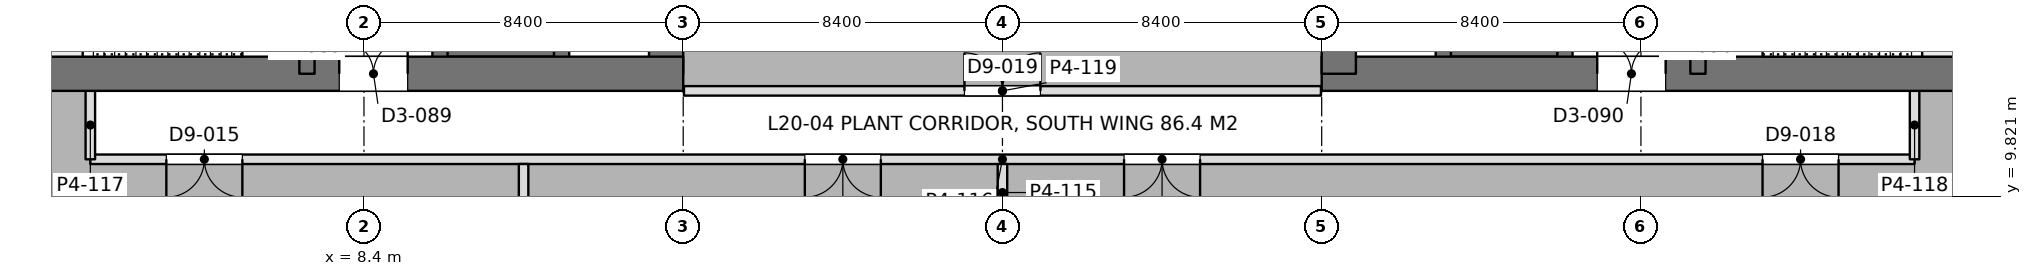
"""IFC4 building model, lengths in metres.
Left out: names, types, materials, properties, quantities, classifications, styles, units other than length and angle.
Written with IfcOpenShell. Run it as: python <this file> out.ifc"""

import sys

from ifc_helpers import new_model, si_unit, direction, frame, frame_2d, origin, place, context, subcontext, project, spatial, rectangle, extrude, element, fill, save


model = new_model("IFC4")
c1 = context("Model", 3, precision=1e-05, world=origin(), true_north=direction((0.0, 1.0)))
c2 = subcontext(c1, "Body", "Model", "MODEL_VIEW")
j1 = project(units=[si_unit("LENGTHUNIT", "METRE"), si_unit("PLANEANGLEUNIT", "RADIAN")], contexts=[c1])
p1 = place(None, origin())
s1 = spatial("IfcSite", under=j1, at=p1, CompositionType="ELEMENT")
p2 = place(p1, origin())
s2 = spatial("IfcBuilding", under=s1, at=p2, CompositionType="ELEMENT")
p3 = place(p2, frame((0.0, 0.0, 90.9)))
s3 = spatial("IfcBuildingStorey", under=s2, at=p3, CompositionType="ELEMENT", Elevation=90.9)
p4 = place(p3, frame((-1.2, 13.05, 0.0), z_axis=(0.0, 0.0, 1.0), x_axis=(1.0, 0.0, 0.0)))
e1 = element("IfcWall", 1, at=p4, inside=s3, PredefinedType="SHEAR", context=c2, shape_type="SweptSolid", body=[
    extrude(rectangle(XDim=18.0, YDim=0.9, at=frame_2d((9.0, 0.0))), origin(), (0.0, 0.0, 1.0), 5.4),
])
p5 = place(p4, frame((8.95, 0.0, 0.0)))
e2 = element("IfcOpeningElement", 2, at=p5, cuts=e1, PredefinedType="OPENING", context=c2, shape_type="SweptSolid", body=[
    extrude(rectangle(XDim=1.8, YDim=2.4, at=frame_2d((0.9, 1.2))), frame((0.0, 0.46, 0.0), z_axis=(0.0, -1.0, 0.0), x_axis=(1.0, 0.0, 0.0)), (0.0, 0.0, 1.0), 0.92),
])
p6 = place(p3, frame((16.35, 13.05, 0.0), z_axis=(0.0, 0.0, 1.0), x_axis=(0.0, 1.0, 0.0)))
e3 = element("IfcWall", 3, at=p6, inside=s3, PredefinedType="SHEAR", context=c2, shape_type="SweptSolid", body=[
    extrude(rectangle(XDim=24.3, YDim=0.9, at=frame_2d((12.15, 0.0))), origin(), (0.0, 0.0, 1.0), 5.4),
])
p7 = place(p3, frame((6.9, 13.05, 0.0), z_axis=(0.0, 0.0, 1.0), x_axis=(0.0, 1.0, 0.0)))
e4 = element("IfcWall", 4, at=p7, inside=s3, PredefinedType="SHEAR", context=c2, shape_type="SweptSolid", body=[
    extrude(rectangle(XDim=24.3, YDim=0.4, at=frame_2d((12.15, 0.0))), origin(), (0.0, 0.0, 1.0), 5.4),
])
p8 = place(p7, frame((1.3, 0.0, 0.0)))
e5 = element("IfcOpeningElement", 5, at=p8, cuts=e4, PredefinedType="OPENING", context=c2, shape_type="SweptSolid", body=[
    extrude(rectangle(XDim=1.0, YDim=2.2, at=frame_2d((0.5, 1.1))), frame((0.0, 0.21, 0.0), z_axis=(0.0, -1.0, 0.0), x_axis=(1.0, 0.0, 0.0)), (0.0, 0.0, 1.0), 0.42),
])
p9 = place(p7, frame((22.0, 0.0, 0.0)))
e6 = element("IfcOpeningElement", 6, at=p9, cuts=e4, PredefinedType="OPENING", context=c2, shape_type="SweptSolid", body=[
    extrude(rectangle(XDim=1.0, YDim=2.2, at=frame_2d((0.5, 1.1))), frame((0.0, 0.21, 0.0), z_axis=(0.0, -1.0, 0.0), x_axis=(1.0, 0.0, 0.0)), (0.0, 0.0, 1.0), 0.42),
])
p10 = place(p7, frame((5.55, 0.0, 0.0)))
e7 = element("IfcOpeningElement", 7, at=p10, cuts=e4, PredefinedType="OPENING", context=c2, shape_type="SweptSolid", body=[
    extrude(rectangle(XDim=1.0, YDim=2.2, at=frame_2d((0.5, 1.1))), frame((0.0, 0.21, 0.0), z_axis=(0.0, -1.0, 0.0), x_axis=(1.0, 0.0, 0.0)), (0.0, 0.0, 1.0), 0.42),
])
p11 = place(p7, frame((9.55, 0.0, 0.0)))
e8 = element("IfcOpeningElement", 8, at=p11, cuts=e4, PredefinedType="OPENING", context=c2, shape_type="SweptSolid", body=[
    extrude(rectangle(XDim=1.0, YDim=2.2, at=frame_2d((0.5, 1.1))), frame((0.0, 0.21, 0.0), z_axis=(0.0, -1.0, 0.0), x_axis=(1.0, 0.0, 0.0)), (0.0, 0.0, 1.0), 0.42),
])
p12 = place(p7, frame((12.8, 0.0, 0.0)))
e9 = element("IfcOpeningElement", 9, at=p12, cuts=e4, PredefinedType="OPENING", context=c2, shape_type="SweptSolid", body=[
    extrude(rectangle(XDim=1.1, YDim=2.2, at=frame_2d((0.55, 1.1))), frame((0.0, 0.21, 0.0), z_axis=(0.0, -1.0, 0.0), x_axis=(1.0, 0.0, 0.0)), (0.0, 0.0, 1.0), 0.42),
])
p13 = place(p7, frame((15.538, 0.0, 0.0)))
e10 = element("IfcOpeningElement", 10, at=p13, cuts=e4, PredefinedType="OPENING", context=c2, shape_type="SweptSolid", body=[
    extrude(rectangle(XDim=1.1, YDim=2.2, at=frame_2d((0.55, 1.1))), frame((0.0, 0.21, 0.0), z_axis=(0.0, -1.0, 0.0), x_axis=(1.0, 0.0, 0.0)), (0.0, 0.0, 1.0), 0.42),
])
p14 = place(p7, frame((18.262, 0.0, 0.0)))
e11 = element("IfcOpeningElement", 11, at=p14, cuts=e4, PredefinedType="OPENING", context=c2, shape_type="SweptSolid", body=[
    extrude(rectangle(XDim=1.1, YDim=2.2, at=frame_2d((0.55, 1.1))), frame((0.0, 0.21, 0.0), z_axis=(0.0, -1.0, 0.0), x_axis=(1.0, 0.0, 0.0)), (0.0, 0.0, 1.0), 0.42),
])
p15 = place(p3, frame((10.4, 13.05, 0.0), z_axis=(0.0, 0.0, 1.0), x_axis=(0.0, 1.0, 0.0)))
e12 = element("IfcWall", 12, at=p15, inside=s3, PredefinedType="SHEAR", context=c2, shape_type="SweptSolid", body=[
    extrude(rectangle(XDim=24.3, YDim=0.4, at=frame_2d((12.15, 0.0))), origin(), (0.0, 0.0, 1.0), 5.4),
])
p16 = place(p15, frame((1.5, 0.0, 0.0)))
e13 = element("IfcOpeningElement", 13, at=p16, cuts=e12, PredefinedType="OPENING", context=c2, shape_type="SweptSolid", body=[
    extrude(rectangle(XDim=1.1, YDim=2.2, at=frame_2d((0.55, 1.1))), frame((0.0, 0.21, 0.0), z_axis=(0.0, -1.0, 0.0), x_axis=(1.0, 0.0, 0.0)), (0.0, 0.0, 1.0), 0.42),
])
p17 = place(p15, frame((4.35, 0.0, 0.0)))
e14 = element("IfcOpeningElement", 14, at=p17, cuts=e12, PredefinedType="OPENING", context=c2, shape_type="SweptSolid", body=[
    extrude(rectangle(XDim=1.1, YDim=2.2, at=frame_2d((0.55, 1.1))), frame((0.0, 0.21, 0.0), z_axis=(0.0, -1.0, 0.0), x_axis=(1.0, 0.0, 0.0)), (0.0, 0.0, 1.0), 0.42),
])
p18 = place(p15, frame((7.2, 0.0, 0.0)))
e15 = element("IfcOpeningElement", 15, at=p18, cuts=e12, PredefinedType="OPENING", context=c2, shape_type="SweptSolid", body=[
    extrude(rectangle(XDim=1.1, YDim=2.2, at=frame_2d((0.55, 1.1))), frame((0.0, 0.21, 0.0), z_axis=(0.0, -1.0, 0.0), x_axis=(1.0, 0.0, 0.0)), (0.0, 0.0, 1.0), 0.42),
])
p19 = place(p15, frame((21.45, 0.0, 0.0)))
e16 = element("IfcOpeningElement", 16, at=p19, cuts=e12, PredefinedType="OPENING", context=c2, shape_type="SweptSolid", body=[
    extrude(rectangle(XDim=1.1, YDim=2.2, at=frame_2d((0.55, 1.1))), frame((0.0, 0.21, 0.0), z_axis=(0.0, -1.0, 0.0), x_axis=(1.0, 0.0, 0.0)), (0.0, 0.0, 1.0), 0.42),
])
p20 = place(p3, frame((13.6, 13.05, 0.0), z_axis=(0.0, 0.0, 1.0), x_axis=(0.0, 1.0, 0.0)))
e17 = element("IfcWall", 17, at=p20, inside=s3, PredefinedType="SHEAR", context=c2, shape_type="SweptSolid", body=[
    extrude(rectangle(XDim=24.3, YDim=0.4, at=frame_2d((12.15, 0.0))), origin(), (0.0, 0.0, 1.0), 5.4),
])
p21 = place(p3, frame((10.4, 13.65, 0.0), z_axis=(0.0, 0.0, 1.0), x_axis=(1.0, 0.0, 0.0)))
e18 = element("IfcWall", 18, at=p21, inside=s3, PredefinedType="SHEAR", context=c2, shape_type="SweptSolid", body=[
    extrude(rectangle(XDim=3.2, YDim=0.3, at=frame_2d((1.6, 0.0))), origin(), (0.0, 0.0, 1.0), 5.4),
])
p22 = place(p3, frame((33.6, 13.05, 0.0), z_axis=(0.0, 0.0, 1.0), x_axis=(1.0, 0.0, 0.0)))
e19 = element("IfcWall", 19, at=p22, inside=s3, PredefinedType="SHEAR", context=c2, shape_type="SweptSolid", body=[
    extrude(rectangle(XDim=18.0, YDim=0.9, at=frame_2d((9.0, 0.0))), origin(), (0.0, 0.0, 1.0), 5.4),
])
p23 = place(p22, frame((7.25, 0.0, 0.0)))
e20 = element("IfcOpeningElement", 20, at=p23, cuts=e19, PredefinedType="OPENING", context=c2, shape_type="SweptSolid", body=[
    extrude(rectangle(XDim=1.8, YDim=2.4, at=frame_2d((0.9, 1.2))), frame((0.0, 0.46, 0.0), z_axis=(0.0, -1.0, 0.0), x_axis=(1.0, 0.0, 0.0)), (0.0, 0.0, 1.0), 0.92),
])
p24 = place(p3, frame((34.05, 13.05, 0.0), z_axis=(0.0, 0.0, 1.0), x_axis=(0.0, 1.0, 0.0)))
e21 = element("IfcWall", 21, at=p24, inside=s3, PredefinedType="SHEAR", context=c2, shape_type="SweptSolid", body=[
    extrude(rectangle(XDim=24.3, YDim=0.9, at=frame_2d((12.15, 0.0))), origin(), (0.0, 0.0, 1.0), 5.4),
])
p25 = place(p3, frame((43.5, 13.05, 0.0), z_axis=(0.0, 0.0, 1.0), x_axis=(0.0, 1.0, 0.0)))
e22 = element("IfcWall", 22, at=p25, inside=s3, PredefinedType="SHEAR", context=c2, shape_type="SweptSolid", body=[
    extrude(rectangle(XDim=24.3, YDim=0.4, at=frame_2d((12.15, 0.0))), origin(), (0.0, 0.0, 1.0), 5.4),
])
p26 = place(p25, frame((1.3, 0.0, 0.0)))
e23 = element("IfcOpeningElement", 23, at=p26, cuts=e22, PredefinedType="OPENING", context=c2, shape_type="SweptSolid", body=[
    extrude(rectangle(XDim=1.0, YDim=2.2, at=frame_2d((0.5, 1.1))), frame((0.0, 0.21, 0.0), z_axis=(0.0, -1.0, 0.0), x_axis=(1.0, 0.0, 0.0)), (0.0, 0.0, 1.0), 0.42),
])
p27 = place(p25, frame((22.0, 0.0, 0.0)))
e24 = element("IfcOpeningElement", 24, at=p27, cuts=e22, PredefinedType="OPENING", context=c2, shape_type="SweptSolid", body=[
    extrude(rectangle(XDim=1.0, YDim=2.2, at=frame_2d((0.5, 1.1))), frame((0.0, 0.21, 0.0), z_axis=(0.0, -1.0, 0.0), x_axis=(1.0, 0.0, 0.0)), (0.0, 0.0, 1.0), 0.42),
])
p28 = place(p25, frame((5.55, 0.0, 0.0)))
e25 = element("IfcOpeningElement", 25, at=p28, cuts=e22, PredefinedType="OPENING", context=c2, shape_type="SweptSolid", body=[
    extrude(rectangle(XDim=1.0, YDim=2.2, at=frame_2d((0.5, 1.1))), frame((0.0, 0.21, 0.0), z_axis=(0.0, -1.0, 0.0), x_axis=(1.0, 0.0, 0.0)), (0.0, 0.0, 1.0), 0.42),
])
p29 = place(p25, frame((9.55, 0.0, 0.0)))
e26 = element("IfcOpeningElement", 26, at=p29, cuts=e22, PredefinedType="OPENING", context=c2, shape_type="SweptSolid", body=[
    extrude(rectangle(XDim=1.0, YDim=2.2, at=frame_2d((0.5, 1.1))), frame((0.0, 0.21, 0.0), z_axis=(0.0, -1.0, 0.0), x_axis=(1.0, 0.0, 0.0)), (0.0, 0.0, 1.0), 0.42),
])
p30 = place(p25, frame((12.8, 0.0, 0.0)))
e27 = element("IfcOpeningElement", 27, at=p30, cuts=e22, PredefinedType="OPENING", context=c2, shape_type="SweptSolid", body=[
    extrude(rectangle(XDim=1.1, YDim=2.2, at=frame_2d((0.55, 1.1))), frame((0.0, 0.21, 0.0), z_axis=(0.0, -1.0, 0.0), x_axis=(1.0, 0.0, 0.0)), (0.0, 0.0, 1.0), 0.42),
])
p31 = place(p25, frame((15.538, 0.0, 0.0)))
e28 = element("IfcOpeningElement", 28, at=p31, cuts=e22, PredefinedType="OPENING", context=c2, shape_type="SweptSolid", body=[
    extrude(rectangle(XDim=1.1, YDim=2.2, at=frame_2d((0.55, 1.1))), frame((0.0, 0.21, 0.0), z_axis=(0.0, -1.0, 0.0), x_axis=(1.0, 0.0, 0.0)), (0.0, 0.0, 1.0), 0.42),
])
p32 = place(p25, frame((18.262, 0.0, 0.0)))
e29 = element("IfcOpeningElement", 29, at=p32, cuts=e22, PredefinedType="OPENING", context=c2, shape_type="SweptSolid", body=[
    extrude(rectangle(XDim=1.1, YDim=2.2, at=frame_2d((0.55, 1.1))), frame((0.0, 0.21, 0.0), z_axis=(0.0, -1.0, 0.0), x_axis=(1.0, 0.0, 0.0)), (0.0, 0.0, 1.0), 0.42),
])
p33 = place(p3, frame((40.0, 13.05, 0.0), z_axis=(0.0, 0.0, 1.0), x_axis=(0.0, 1.0, 0.0)))
e30 = element("IfcWall", 30, at=p33, inside=s3, PredefinedType="SHEAR", context=c2, shape_type="SweptSolid", body=[
    extrude(rectangle(XDim=24.3, YDim=0.4, at=frame_2d((12.15, 0.0))), origin(), (0.0, 0.0, 1.0), 5.4),
])
p34 = place(p33, frame((1.5, 0.0, 0.0)))
e31 = element("IfcOpeningElement", 31, at=p34, cuts=e30, PredefinedType="OPENING", context=c2, shape_type="SweptSolid", body=[
    extrude(rectangle(XDim=1.1, YDim=2.2, at=frame_2d((0.55, 1.1))), frame((0.0, 0.21, 0.0), z_axis=(0.0, -1.0, 0.0), x_axis=(1.0, 0.0, 0.0)), (0.0, 0.0, 1.0), 0.42),
])
p35 = place(p33, frame((4.35, 0.0, 0.0)))
e32 = element("IfcOpeningElement", 32, at=p35, cuts=e30, PredefinedType="OPENING", context=c2, shape_type="SweptSolid", body=[
    extrude(rectangle(XDim=1.1, YDim=2.2, at=frame_2d((0.55, 1.1))), frame((0.0, 0.21, 0.0), z_axis=(0.0, -1.0, 0.0), x_axis=(1.0, 0.0, 0.0)), (0.0, 0.0, 1.0), 0.42),
])
p36 = place(p33, frame((7.2, 0.0, 0.0)))
e33 = element("IfcOpeningElement", 33, at=p36, cuts=e30, PredefinedType="OPENING", context=c2, shape_type="SweptSolid", body=[
    extrude(rectangle(XDim=1.1, YDim=2.2, at=frame_2d((0.55, 1.1))), frame((0.0, 0.21, 0.0), z_axis=(0.0, -1.0, 0.0), x_axis=(1.0, 0.0, 0.0)), (0.0, 0.0, 1.0), 0.42),
])
p37 = place(p33, frame((21.45, 0.0, 0.0)))
e34 = element("IfcOpeningElement", 34, at=p37, cuts=e30, PredefinedType="OPENING", context=c2, shape_type="SweptSolid", body=[
    extrude(rectangle(XDim=1.1, YDim=2.2, at=frame_2d((0.55, 1.1))), frame((0.0, 0.21, 0.0), z_axis=(0.0, -1.0, 0.0), x_axis=(1.0, 0.0, 0.0)), (0.0, 0.0, 1.0), 0.42),
])
p38 = place(p3, frame((36.8, 13.05, 0.0), z_axis=(0.0, 0.0, 1.0), x_axis=(0.0, 1.0, 0.0)))
e35 = element("IfcWall", 35, at=p38, inside=s3, PredefinedType="SHEAR", context=c2, shape_type="SweptSolid", body=[
    extrude(rectangle(XDim=24.3, YDim=0.4, at=frame_2d((12.15, 0.0))), origin(), (0.0, 0.0, 1.0), 5.4),
])
p39 = place(p3, frame((40.0, 13.65, 0.0), z_axis=(0.0, 0.0, 1.0), x_axis=(-1.0, 0.0, 0.0)))
e36 = element("IfcWall", 36, at=p39, inside=s3, PredefinedType="SHEAR", context=c2, shape_type="SweptSolid", body=[
    extrude(rectangle(XDim=3.2, YDim=0.3, at=frame_2d((1.6, 0.0))), origin(), (0.0, 0.0, 1.0), 5.4),
])
p40 = place(p3, frame((1.2, 10.8, 0.0), z_axis=(0.0, 0.0, 1.0), x_axis=(1.0, 0.0, 0.0)))
e37 = element("IfcWall", 37, at=p40, inside=s3, PredefinedType="PARTITIONING", context=c2, shape_type="SweptSolid", body=[
    extrude(rectangle(XDim=48.0, YDim=0.25, at=frame_2d((24.0, 0.0))), origin(), (0.0, 0.0, 1.0), 4.64),
])
p41 = place(p40, frame((2.0, 0.0, 0.0)))
e38 = element("IfcOpeningElement", 38, at=p41, cuts=e37, PredefinedType="OPENING", context=c2, shape_type="SweptSolid", body=[
    extrude(rectangle(XDim=2.0, YDim=2.4, at=frame_2d((1.0, 1.2))), frame((0.0, 0.135, 0.0), z_axis=(0.0, -1.0, 0.0), x_axis=(1.0, 0.0, 0.0)), (0.0, 0.0, 1.0), 0.27),
])
p42 = place(p40, frame((18.8, 0.0, 0.0)))
e39 = element("IfcOpeningElement", 39, at=p42, cuts=e37, PredefinedType="OPENING", context=c2, shape_type="SweptSolid", body=[
    extrude(rectangle(XDim=2.0, YDim=2.4, at=frame_2d((1.0, 1.2))), frame((0.0, 0.135, 0.0), z_axis=(0.0, -1.0, 0.0), x_axis=(1.0, 0.0, 0.0)), (0.0, 0.0, 1.0), 0.27),
])
p43 = place(p40, frame((27.2, 0.0, 0.0)))
e40 = element("IfcOpeningElement", 40, at=p43, cuts=e37, PredefinedType="OPENING", context=c2, shape_type="SweptSolid", body=[
    extrude(rectangle(XDim=2.0, YDim=2.4, at=frame_2d((1.0, 1.2))), frame((0.0, 0.135, 0.0), z_axis=(0.0, -1.0, 0.0), x_axis=(1.0, 0.0, 0.0)), (0.0, 0.0, 1.0), 0.27),
])
p44 = place(p40, frame((44.0, 0.0, 0.0)))
e41 = element("IfcOpeningElement", 41, at=p44, cuts=e37, PredefinedType="OPENING", context=c2, shape_type="SweptSolid", body=[
    extrude(rectangle(XDim=2.0, YDim=2.4, at=frame_2d((1.0, 1.2))), frame((0.0, 0.135, 0.0), z_axis=(0.0, -1.0, 0.0), x_axis=(1.0, 0.0, 0.0)), (0.0, 0.0, 1.0), 0.27),
])
for number, where, z_axis, x_axis in (
    (42, (1.2, 10.8, 0.0), (0.0, 0.0, 1.0), (0.0, 1.0, 0.0)),
    (43, (49.2, 10.8, 0.0), (0.0, 0.0, 1.0), (0.0, 1.0, 0.0)),
):
    element("IfcWall", number, at=place(p3, frame(where, z_axis=z_axis, x_axis=x_axis)), inside=s3, PredefinedType="PARTITIONING", context=c2, shape_type="SweptSolid", body=[
        extrude(rectangle(XDim=1.802, YDim=0.25, at=frame_2d((0.901, 0.0))), origin(), (0.0, 0.0, 1.0), 5.24),
    ])
p45 = place(p3, frame((25.2, 9.174, 0.0), z_axis=(0.0, 0.0, 1.0), x_axis=(0.0, 1.0, 0.0)))
e44 = element("IfcWall", 44, at=p45, inside=s3, PredefinedType="PARTITIONING", context=c2, shape_type="SweptSolid", body=[
    extrude(rectangle(XDim=1.502, YDim=0.25, at=frame_2d((0.751, 0.0))), origin(), (0.0, 0.0, 1.0), 4.64),
])
p46 = place(p3, frame((12.6, 0.6, 0.0), z_axis=(0.0, 0.0, 1.0), x_axis=(0.0, 1.0, 0.0)))
e45 = element("IfcWall", 45, at=p46, inside=s3, PredefinedType="PARTITIONING", context=c2, shape_type="SweptSolid", body=[
    extrude(rectangle(XDim=10.076, YDim=0.25, at=frame_2d((5.038, 0.0))), origin(), (0.0, 0.0, 1.0), 4.64),
])
p47 = place(p3, frame((16.82, 12.6, 0.0), z_axis=(0.0, 0.0, 1.0), x_axis=(1.0, 0.0, 0.0)))
e46 = element("IfcWall", 46, at=p47, inside=s3, PredefinedType="PARTITIONING", context=c2, shape_type="SweptSolid", body=[
    extrude(rectangle(XDim=16.76, YDim=0.25, at=frame_2d((8.38, 0.0))), origin(), (0.0, 0.0, 1.0), 4.64),
])
p48 = place(p47, frame((7.38, 0.0, 0.0)))
e47 = element("IfcOpeningElement", 47, at=p48, cuts=e46, PredefinedType="OPENING", context=c2, shape_type="SweptSolid", body=[
    extrude(rectangle(XDim=2.0, YDim=2.4, at=frame_2d((1.0, 1.2))), frame((0.0, 0.135, 0.0), z_axis=(0.0, -1.0, 0.0), x_axis=(1.0, 0.0, 0.0)), (0.0, 0.0, 1.0), 0.27),
])
p49 = place(p5, origin())
e48 = element("IfcDoor", 48, at=p49, inside=s3, OperationType="DOUBLE_DOOR_SINGLE_SWING", PredefinedType="DOOR", context=c2, shape_type="SweptSolid", body=[
    extrude(rectangle(XDim=1.8, YDim=2.4, at=frame_2d((0.9, 1.2))), frame((0.0, 0.025, 0.0), z_axis=(0.0, -1.0, 0.0), x_axis=(1.0, 0.0, 0.0)), (0.0, 0.0, 1.0), 0.05),
])
fill(e2, e48)
p50 = place(p23, origin())
e49 = element("IfcDoor", 49, at=p50, inside=s3, OperationType="DOUBLE_DOOR_SINGLE_SWING", PredefinedType="DOOR", context=c2, shape_type="SweptSolid", body=[
    extrude(rectangle(XDim=1.8, YDim=2.4, at=frame_2d((0.9, 1.2))), frame((0.0, 0.025, 0.0), z_axis=(0.0, -1.0, 0.0), x_axis=(1.0, 0.0, 0.0)), (0.0, 0.0, 1.0), 0.05),
])
fill(e20, e49)
p51 = place(p41, frame((2.0, 0.0, 0.0), z_axis=(0.0, 0.0, 1.0), x_axis=(-1.0, 0.0, 0.0)))
e50 = element("IfcDoor", 50, at=p51, inside=s3, OperationType="DOUBLE_DOOR_SINGLE_SWING", PredefinedType="DOOR", context=c2, shape_type="SweptSolid", body=[
    extrude(rectangle(XDim=2.0, YDim=2.4, at=frame_2d((1.0, 1.2))), frame((0.0, 0.025, 0.0), z_axis=(0.0, -1.0, 0.0), x_axis=(1.0, 0.0, 0.0)), (0.0, 0.0, 1.0), 0.05),
])
fill(e38, e50)
p52 = place(p42, frame((2.0, 0.0, 0.0), z_axis=(0.0, 0.0, 1.0), x_axis=(-1.0, 0.0, 0.0)))
e51 = element("IfcDoor", 51, at=p52, inside=s3, OperationType="DOUBLE_DOOR_SINGLE_SWING", PredefinedType="DOOR", context=c2, shape_type="SweptSolid", body=[
    extrude(rectangle(XDim=2.0, YDim=2.4, at=frame_2d((1.0, 1.2))), frame((0.0, 0.025, 0.0), z_axis=(0.0, -1.0, 0.0), x_axis=(1.0, 0.0, 0.0)), (0.0, 0.0, 1.0), 0.05),
])
fill(e39, e51)
p53 = place(p43, frame((2.0, 0.0, 0.0), z_axis=(0.0, 0.0, 1.0), x_axis=(-1.0, 0.0, 0.0)))
e52 = element("IfcDoor", 52, at=p53, inside=s3, OperationType="DOUBLE_DOOR_SINGLE_SWING", PredefinedType="DOOR", context=c2, shape_type="SweptSolid", body=[
    extrude(rectangle(XDim=2.0, YDim=2.4, at=frame_2d((1.0, 1.2))), frame((0.0, 0.025, 0.0), z_axis=(0.0, -1.0, 0.0), x_axis=(1.0, 0.0, 0.0)), (0.0, 0.0, 1.0), 0.05),
])
fill(e40, e52)
p54 = place(p44, frame((2.0, 0.0, 0.0), z_axis=(0.0, 0.0, 1.0), x_axis=(-1.0, 0.0, 0.0)))
e53 = element("IfcDoor", 53, at=p54, inside=s3, OperationType="DOUBLE_DOOR_SINGLE_SWING", PredefinedType="DOOR", context=c2, shape_type="SweptSolid", body=[
    extrude(rectangle(XDim=2.0, YDim=2.4, at=frame_2d((1.0, 1.2))), frame((0.0, 0.025, 0.0), z_axis=(0.0, -1.0, 0.0), x_axis=(1.0, 0.0, 0.0)), (0.0, 0.0, 1.0), 0.05),
])
fill(e41, e53)
p55 = place(p48, origin())
e54 = element("IfcDoor", 54, at=p55, inside=s3, OperationType="DOUBLE_DOOR_SINGLE_SWING", PredefinedType="DOOR", context=c2, shape_type="SweptSolid", body=[
    extrude(rectangle(XDim=2.0, YDim=2.4, at=frame_2d((1.0, 1.2))), frame((0.0, 0.025, 0.0), z_axis=(0.0, -1.0, 0.0), x_axis=(1.0, 0.0, 0.0)), (0.0, 0.0, 1.0), 0.05),
])
fill(e47, e54)
save(model, sys.argv[1])
